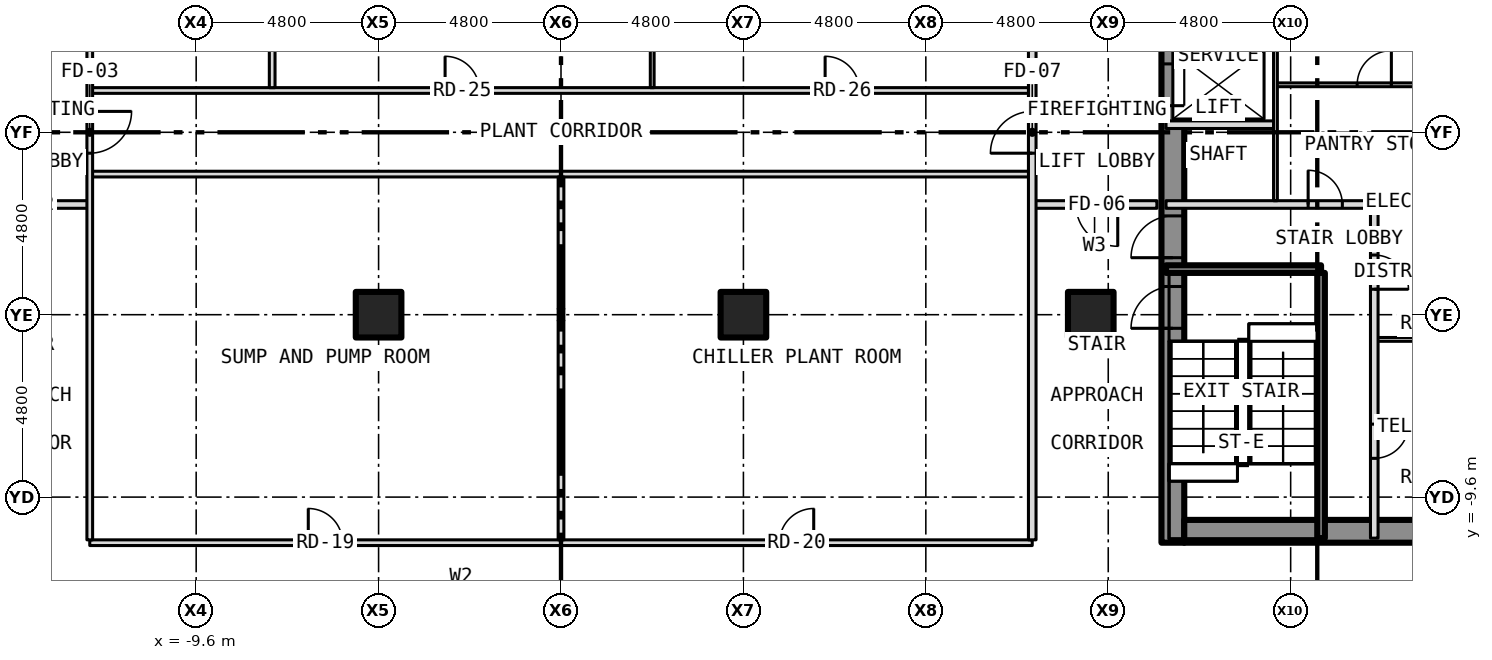
"""IFC4 building model, lengths in metres.
Left out: names, types, materials, properties, quantities, classifications, styles, units other than length and angle.
Written with IfcOpenShell. Run it as: python <this file> out.ifc"""

import sys

from ifc_helpers import new_model, si_unit, direction, frame, frame_2d, origin, origin_2d, place, context, subcontext, project, spatial, rectangle, hollow_rectangle, extrude, element, fill, save


model = new_model("IFC4")
c1 = context("Model", 3, precision=1e-05, world=origin(), true_north=direction((0.0, 1.0)))
c2 = subcontext(c1, "Body", "Model", "MODEL_VIEW")
j1 = project(units=[si_unit("LENGTHUNIT", "METRE"), si_unit("PLANEANGLEUNIT", "RADIAN")], contexts=[c1])
p1 = place(None, origin())
s1 = spatial("IfcSite", under=j1, at=p1, CompositionType="ELEMENT")
p2 = place(p1, origin())
s2 = spatial("IfcBuilding", under=s1, at=p2, CompositionType="ELEMENT")
p3 = place(p2, frame((0.0, 0.0, -10.0)))
s3 = spatial("IfcBuildingStorey", under=s2, at=p3, CompositionType="ELEMENT", Elevation=-10.0)
for number, where, z_axis, x_axis in (
    (1, (-4.8, -4.8, -0.6), (0.0, 0.0, 1.0), (1.0, 0.0, 0.0)),
    (2, (4.8, -4.8, -0.6), (0.0, 0.0, 1.0), (1.0, 0.0, 0.0)),
    (3, (13.94, -4.8, -0.6), (0.0, 0.0, 1.0), (1.0, 0.0, 0.0)),
):
    element("IfcColumn", number, at=place(p3, frame(where, z_axis=z_axis, x_axis=x_axis)), inside=s3, PredefinedType="COLUMN", context=c2, shape_type="SweptSolid", body=[
        extrude(hollow_rectangle(XDim=1.2, YDim=1.2, WallThickness=0.07, at=origin_2d()), origin(), (0.0, 0.0, 1.0), 5.3),
    ])
p4 = place(p3, frame((16.1, -10.8, 0.0), z_axis=(0.0, 0.0, 1.0), x_axis=(0.0, 1.0, 0.0)))
e4 = element("IfcWall", 4, at=p4, inside=s3, PredefinedType="SHEAR", context=c2, shape_type="SweptSolid", body=[
    extrude(rectangle(XDim=21.6, YDim=0.6, at=frame_2d((10.8, 0.0))), origin(), (0.0, 0.0, 1.0), 4.7),
])
p5 = place(p4, frame((11.5, 0.0, 0.0)))
e5 = element("IfcOpeningElement", 5, at=p5, cuts=e4, PredefinedType="OPENING", context=c2, shape_type="SweptSolid", body=[
    extrude(rectangle(XDim=1.1, YDim=2.1, at=frame_2d((0.55, 1.05))), frame((0.0, 0.312, 0.0), z_axis=(0.0, -1.0, 0.0), x_axis=(1.0, 0.0, 0.0)), (0.0, 0.0, 1.0), 0.624),
])
p6 = place(p4, frame((5.642, 0.0, 0.0)))
e6 = element("IfcOpeningElement", 6, at=p6, cuts=e4, PredefinedType="OPENING", context=c2, shape_type="SweptSolid", body=[
    extrude(rectangle(XDim=1.1, YDim=2.1, at=frame_2d((0.55, 1.05))), frame((0.0, 0.312, 0.0), z_axis=(0.0, -1.0, 0.0), x_axis=(1.0, 0.0, 0.0)), (0.0, 0.0, 1.0), 0.624),
])
p7 = place(p4, frame((7.5, 0.0, 0.0)))
e7 = element("IfcOpeningElement", 7, at=p7, cuts=e4, PredefinedType="OPENING", context=c2, shape_type="SweptSolid", body=[
    extrude(rectangle(XDim=1.1, YDim=2.1, at=frame_2d((0.55, 1.05))), frame((0.0, 0.312, 0.0), z_axis=(0.0, -1.0, 0.0), x_axis=(1.0, 0.0, 0.0)), (0.0, 0.0, 1.0), 0.624),
])
p8 = place(p3, frame((16.4, -10.5, 0.0), z_axis=(0.0, 0.0, 1.0), x_axis=(1.0, 0.0, 0.0)))
e8 = element("IfcWall", 8, at=p8, inside=s3, PredefinedType="SHEAR", context=c2, shape_type="SweptSolid", body=[
    extrude(rectangle(XDim=7.0, YDim=0.6, at=frame_2d((3.5, 0.0))), origin(), (0.0, 0.0, 1.0), 4.7),
])
p9 = place(p3, frame((-12.4, -10.8, 0.0), z_axis=(0.0, 0.0, 1.0), x_axis=(1.0, 0.0, 0.0)))
e9 = element("IfcWall", 9, at=p9, inside=s3, PredefinedType="PARTITIONING", context=c2, shape_type="SweptSolid", body=[
    extrude(rectangle(XDim=24.8, YDim=0.15, at=frame_2d((12.4, 0.0))), origin(), (0.0, 0.0, 1.0), 4.7),
])
p10 = place(p9, frame((5.75, 0.0, 0.0)))
e10 = element("IfcOpeningElement", 10, at=p10, cuts=e9, PredefinedType="OPENING", context=c2, shape_type="SweptSolid", body=[
    extrude(rectangle(XDim=0.9, YDim=2.1, at=frame_2d((0.45, 1.05))), frame((0.0, 0.087, 0.0), z_axis=(0.0, -1.0, 0.0), x_axis=(1.0, 0.0, 0.0)), (0.0, 0.0, 1.0), 0.174),
])
p11 = place(p9, frame((18.15, 0.0, 0.0)))
e11 = element("IfcOpeningElement", 11, at=p11, cuts=e9, PredefinedType="OPENING", context=c2, shape_type="SweptSolid", body=[
    extrude(rectangle(XDim=0.9, YDim=2.1, at=frame_2d((0.45, 1.05))), frame((0.0, 0.087, 0.0), z_axis=(0.0, -1.0, 0.0), x_axis=(1.0, 0.0, 0.0)), (0.0, 0.0, 1.0), 0.174),
])
p12 = place(p3, frame((21.4, -5.45, 0.0), z_axis=(0.0, 0.0, 1.0), x_axis=(1.0, 0.0, 0.0)))
e12 = element("IfcWall", 12, at=p12, inside=s3, PredefinedType="PARTITIONING", context=c2, shape_type="SweptSolid", body=[
    extrude(rectangle(XDim=2.48, YDim=0.1, at=frame_2d((1.24, 0.0))), origin(), (0.0, 0.0, 1.0), 4.7),
])
p13 = place(p3, frame((15.92, -3.6, 0.0), z_axis=(0.0, 0.0, 1.0), x_axis=(1.0, 0.0, 0.0)))
e13 = element("IfcWall", 13, at=p13, inside=s3, PredefinedType="SHEAR", context=c2, shape_type="SweptSolid", body=[
    extrude(rectangle(XDim=4.08, YDim=0.2, at=frame_2d((2.04, 0.0))), origin(), (0.0, 0.0, 1.0), 4.7),
])
p14 = place(p3, frame((-15.68, -1.9, 0.0), z_axis=(0.0, 0.0, 1.0), x_axis=(1.0, 0.0, 0.0)))
e14 = element("IfcWall", 14, at=p14, inside=s3, PredefinedType="PARTITIONING", context=c2, shape_type="SweptSolid", body=[
    extrude(rectangle(XDim=3.28, YDim=0.2, at=frame_2d((1.64, 0.0))), origin(), (0.0, 0.0, 1.0), 4.7),
])
p15 = place(p14, frame((1.03, 0.0, 0.0)))
e15 = element("IfcOpeningElement", 15, at=p15, cuts=e14, PredefinedType="OPENING", context=c2, shape_type="SweptSolid", body=[
    extrude(rectangle(XDim=1.1, YDim=2.1, at=frame_2d((0.55, 1.05))), frame((0.0, 0.112, 0.0), z_axis=(0.0, -1.0, 0.0), x_axis=(1.0, 0.0, 0.0)), (0.0, 0.0, 1.0), 0.224),
])
p16 = place(p3, frame((12.4, -1.9, 0.0), z_axis=(0.0, 0.0, 1.0), x_axis=(1.0, 0.0, 0.0)))
e16 = element("IfcWall", 16, at=p16, inside=s3, PredefinedType="PARTITIONING", context=c2, shape_type="SweptSolid", body=[
    extrude(rectangle(XDim=3.28, YDim=0.2, at=frame_2d((1.64, 0.0))), origin(), (0.0, 0.0, 1.0), 4.7),
])
p17 = place(p16, frame((1.15, 0.0, 0.0)))
e17 = element("IfcOpeningElement", 17, at=p17, cuts=e16, PredefinedType="OPENING", context=c2, shape_type="SweptSolid", body=[
    extrude(rectangle(XDim=1.1, YDim=2.1, at=frame_2d((0.55, 1.05))), frame((0.0, 0.112, 0.0), z_axis=(0.0, -1.0, 0.0), x_axis=(1.0, 0.0, 0.0)), (0.0, 0.0, 1.0), 0.224),
])
p18 = place(p3, frame((15.92, -1.9, 0.0), z_axis=(0.0, 0.0, 1.0), x_axis=(1.0, 0.0, 0.0)))
e18 = element("IfcWall", 18, at=p18, inside=s3, PredefinedType="PARTITIONING", context=c2, shape_type="SweptSolid", body=[
    extrude(rectangle(XDim=7.96, YDim=0.2, at=frame_2d((3.98, 0.0))), origin(), (0.0, 0.0, 1.0), 4.7),
])
p19 = place(p18, frame((3.74, 0.0, 0.0)))
e19 = element("IfcOpeningElement", 19, at=p19, cuts=e18, PredefinedType="OPENING", context=c2, shape_type="SweptSolid", body=[
    extrude(rectangle(XDim=0.9, YDim=2.1, at=frame_2d((0.45, 1.05))), frame((0.0, 0.112, 0.0), z_axis=(0.0, -1.0, 0.0), x_axis=(1.0, 0.0, 0.0)), (0.0, 0.0, 1.0), 0.224),
])
p20 = place(p3, frame((-12.4, -1.1, 0.0), z_axis=(0.0, 0.0, 1.0), x_axis=(1.0, 0.0, 0.0)))
e20 = element("IfcWall", 20, at=p20, inside=s3, PredefinedType="PARTITIONING", context=c2, shape_type="SweptSolid", body=[
    extrude(rectangle(XDim=24.8, YDim=0.15, at=frame_2d((12.4, 0.0))), origin(), (0.0, 0.0, 1.0), 4.7),
])
p21 = place(p3, frame((15.92, 0.2, 0.0), z_axis=(0.0, 0.0, 1.0), x_axis=(1.0, 0.0, 0.0)))
e21 = element("IfcWall", 21, at=p21, inside=s3, PredefinedType="PARTITIONING", context=c2, shape_type="SweptSolid", body=[
    extrude(rectangle(XDim=2.88, YDim=0.2, at=frame_2d((1.44, 0.0))), origin(), (0.0, 0.0, 1.0), 4.7),
])
p22 = place(p3, frame((-12.4, 1.1, 0.0), z_axis=(0.0, 0.0, 1.0), x_axis=(1.0, 0.0, 0.0)))
e22 = element("IfcWall", 22, at=p22, inside=s3, PredefinedType="PARTITIONING", context=c2, shape_type="SweptSolid", body=[
    extrude(rectangle(XDim=24.8, YDim=0.15, at=frame_2d((12.4, 0.0))), origin(), (0.0, 0.0, 1.0), 4.7),
])
p23 = place(p22, frame((9.35, 0.0, 0.0)))
e23 = element("IfcOpeningElement", 23, at=p23, cuts=e22, PredefinedType="OPENING", context=c2, shape_type="SweptSolid", body=[
    extrude(rectangle(XDim=0.9, YDim=2.1, at=frame_2d((0.45, 1.05))), frame((0.0, 0.087, 0.0), z_axis=(0.0, -1.0, 0.0), x_axis=(1.0, 0.0, 0.0)), (0.0, 0.0, 1.0), 0.174),
])
p24 = place(p22, frame((19.35, 0.0, 0.0)))
e24 = element("IfcOpeningElement", 24, at=p24, cuts=e22, PredefinedType="OPENING", context=c2, shape_type="SweptSolid", body=[
    extrude(rectangle(XDim=0.9, YDim=2.1, at=frame_2d((0.45, 1.05))), frame((0.0, 0.087, 0.0), z_axis=(0.0, -1.0, 0.0), x_axis=(1.0, 0.0, 0.0)), (0.0, 0.0, 1.0), 0.174),
])
p25 = place(p3, frame((18.8, 1.25, 0.0), z_axis=(0.0, 0.0, 1.0), x_axis=(1.0, 0.0, 0.0)))
e25 = element("IfcWall", 25, at=p25, inside=s3, PredefinedType="PARTITIONING", context=c2, shape_type="SweptSolid", body=[
    extrude(rectangle(XDim=5.08, YDim=0.1, at=frame_2d((2.54, 0.0))), origin(), (0.0, 0.0, 1.0), 4.7),
])
p26 = place(p25, frame((2.15, 0.0, 0.0)))
e26 = element("IfcOpeningElement", 26, at=p26, cuts=e25, PredefinedType="OPENING", context=c2, shape_type="SweptSolid", body=[
    extrude(rectangle(XDim=0.9, YDim=2.1, at=frame_2d((0.45, 1.05))), frame((0.0, 0.062, 0.0), z_axis=(0.0, -1.0, 0.0), x_axis=(1.0, 0.0, 0.0)), (0.0, 0.0, 1.0), 0.124),
])
p27 = place(p3, frame((-12.4, -10.725, 0.0), z_axis=(0.0, 0.0, 1.0), x_axis=(0.0, 1.0, 0.0)))
e27 = element("IfcWall", 27, at=p27, inside=s3, PredefinedType="PARTITIONING", context=c2, shape_type="SweptSolid", body=[
    extrude(rectangle(XDim=12.925, YDim=0.15, at=frame_2d((6.462, 0.0))), origin(), (0.0, 0.0, 1.0), 4.7),
])
p28 = place(p27, frame((10.175, 0.0, 0.0)))
e28 = element("IfcOpeningElement", 28, at=p28, cuts=e27, PredefinedType="OPENING", context=c2, shape_type="SweptSolid", body=[
    extrude(rectangle(XDim=1.1, YDim=2.1, at=frame_2d((0.55, 1.05))), frame((0.0, 0.087, 0.0), z_axis=(0.0, -1.0, 0.0), x_axis=(1.0, 0.0, 0.0)), (0.0, 0.0, 1.0), 0.174),
])
p29 = place(p3, frame((-7.6, 1.175, 0.0), z_axis=(0.0, 0.0, 1.0), x_axis=(0.0, 1.0, 0.0)))
e29 = element("IfcWall", 29, at=p29, inside=s3, PredefinedType="PARTITIONING", context=c2, shape_type="SweptSolid", body=[
    extrude(rectangle(XDim=11.075, YDim=0.15, at=frame_2d((5.538, 0.0))), origin(), (0.0, 0.0, 1.0), 4.7),
])
p30 = place(p3, frame((0.0, -10.725, 0.0), z_axis=(0.0, 0.0, 1.0), x_axis=(0.0, 1.0, 0.0)))
e30 = element("IfcWall", 30, at=p30, inside=s3, PredefinedType="PARTITIONING", context=c2, shape_type="SweptSolid", body=[
    extrude(rectangle(XDim=5.771, YDim=0.15, at=frame_2d((2.885, 0.0))), origin(), (0.0, 0.0, 1.0), 4.083),
])
p31 = place(p3, frame((0.0, -4.954, 0.0), z_axis=(0.0, 0.0, 1.0), x_axis=(0.0, 1.0, 0.0)))
e31 = element("IfcWall", 31, at=p31, inside=s3, PredefinedType="PARTITIONING", context=c2, shape_type="SweptSolid", body=[
    extrude(rectangle(XDim=0.308, YDim=0.15, at=frame_2d((0.154, 0.0))), origin(), (0.0, 0.0, 1.0), 4.7),
])
p32 = place(p3, frame((0.0, -4.646, 0.0), z_axis=(0.0, 0.0, 1.0), x_axis=(0.0, 1.0, 0.0)))
e32 = element("IfcWall", 32, at=p32, inside=s3, PredefinedType="PARTITIONING", context=c2, shape_type="SweptSolid", body=[
    extrude(rectangle(XDim=3.471, YDim=0.15, at=frame_2d((1.735, 0.0))), origin(), (0.0, 0.0, 1.0), 4.083),
])
p33 = place(p3, frame((2.4, 1.175, 0.0), z_axis=(0.0, 0.0, 1.0), x_axis=(0.0, 1.0, 0.0)))
e33 = element("IfcWall", 33, at=p33, inside=s3, PredefinedType="PARTITIONING", context=c2, shape_type="SweptSolid", body=[
    extrude(rectangle(XDim=11.075, YDim=0.1, at=frame_2d((5.538, 0.0))), origin(), (0.0, 0.0, 1.0), 4.7),
])
p34 = place(p3, frame((12.4, -10.725, 0.0), z_axis=(0.0, 0.0, 1.0), x_axis=(0.0, 1.0, 0.0)))
e34 = element("IfcWall", 34, at=p34, inside=s3, PredefinedType="PARTITIONING", context=c2, shape_type="SweptSolid", body=[
    extrude(rectangle(XDim=22.975, YDim=0.2, at=frame_2d((11.488, 0.0))), origin(), (0.0, 0.0, 1.0), 4.7),
])
p35 = place(p34, frame((10.175, 0.0, 0.0)))
e35 = element("IfcOpeningElement", 35, at=p35, cuts=e34, PredefinedType="OPENING", context=c2, shape_type="SweptSolid", body=[
    extrude(rectangle(XDim=1.1, YDim=2.1, at=frame_2d((0.55, 1.05))), frame((0.0, 0.112, 0.0), z_axis=(0.0, -1.0, 0.0), x_axis=(1.0, 0.0, 0.0)), (0.0, 0.0, 1.0), 0.224),
])
p36 = place(p3, frame((18.8, -1.8, 0.0), z_axis=(0.0, 0.0, 1.0), x_axis=(0.0, 1.0, 0.0)))
e36 = element("IfcWall", 36, at=p36, inside=s3, PredefinedType="PARTITIONING", context=c2, shape_type="SweptSolid", body=[
    extrude(rectangle(XDim=12.48, YDim=0.1, at=frame_2d((6.24, 0.0))), origin(), (0.0, 0.0, 1.0), 4.7),
])
p37 = place(p3, frame((20.0, -10.68, 0.0), z_axis=(0.0, 0.0, 1.0), x_axis=(0.0, 1.0, 0.0)))
e37 = element("IfcWall", 37, at=p37, inside=s3, PredefinedType="SHEAR", context=c2, shape_type="SweptSolid", body=[
    extrude(rectangle(XDim=6.98, YDim=0.2, at=frame_2d((3.49, 0.0))), origin(), (0.0, 0.0, 1.0), 4.7),
])
p38 = place(p3, frame((21.4, -10.68, 0.0), z_axis=(0.0, 0.0, 1.0), x_axis=(0.0, 1.0, 0.0)))
e38 = element("IfcWall", 38, at=p38, inside=s3, PredefinedType="PARTITIONING", context=c2, shape_type="SweptSolid", body=[
    extrude(rectangle(XDim=8.68, YDim=0.2, at=frame_2d((4.34, 0.0))), origin(), (0.0, 0.0, 1.0), 4.7),
])
p39 = place(p38, frame((2.1, 0.0, 0.0)))
e39 = element("IfcOpeningElement", 39, at=p39, cuts=e38, PredefinedType="OPENING", context=c2, shape_type="SweptSolid", body=[
    extrude(rectangle(XDim=0.9, YDim=2.1, at=frame_2d((0.45, 1.05))), frame((0.0, 0.112, 0.0), z_axis=(0.0, -1.0, 0.0), x_axis=(1.0, 0.0, 0.0)), (0.0, 0.0, 1.0), 0.224),
])
p40 = place(p38, frame((6.55, 0.0, 0.0)))
e40 = element("IfcOpeningElement", 40, at=p40, cuts=e38, PredefinedType="OPENING", context=c2, shape_type="SweptSolid", body=[
    extrude(rectangle(XDim=0.9, YDim=2.1, at=frame_2d((0.45, 1.05))), frame((0.0, 0.112, 0.0), z_axis=(0.0, -1.0, 0.0), x_axis=(1.0, 0.0, 0.0)), (0.0, 0.0, 1.0), 0.224),
])
p41 = place(p5, origin())
e41 = element("IfcDoor", 41, at=p41, inside=s3, OperationType="SLIDING_TO_LEFT", PredefinedType="DOOR", context=c2, shape_type="SweptSolid", body=[
    extrude(rectangle(XDim=1.1, YDim=2.1, at=frame_2d((0.55, 1.05))), frame((0.0, 0.025, 0.0), z_axis=(0.0, -1.0, 0.0), x_axis=(1.0, 0.0, 0.0)), (0.0, 0.0, 1.0), 0.05),
])
fill(e5, e41)
p42 = place(p28, origin())
e42 = element("IfcDoor", 42, at=p42, inside=s3, OperationType="SINGLE_SWING_RIGHT", PredefinedType="DOOR", context=c2, shape_type="SweptSolid", body=[
    extrude(rectangle(XDim=1.1, YDim=2.1, at=frame_2d((0.55, 1.05))), frame((0.0, 0.025, 0.0), z_axis=(0.0, -1.0, 0.0), x_axis=(1.0, 0.0, 0.0)), (0.0, 0.0, 1.0), 0.05),
])
fill(e28, e42)
p43 = place(p6, origin())
e43 = element("IfcDoor", 43, at=p43, inside=s3, OperationType="SINGLE_SWING_LEFT", PredefinedType="DOOR", context=c2, shape_type="SweptSolid", body=[
    extrude(rectangle(XDim=1.1, YDim=2.1, at=frame_2d((0.55, 1.05))), frame((0.0, 0.025, 0.0), z_axis=(0.0, -1.0, 0.0), x_axis=(1.0, 0.0, 0.0)), (0.0, 0.0, 1.0), 0.05),
])
fill(e6, e43)
p44 = place(p7, origin())
e44 = element("IfcDoor", 44, at=p44, inside=s3, OperationType="SINGLE_SWING_LEFT", PredefinedType="DOOR", context=c2, shape_type="SweptSolid", body=[
    extrude(rectangle(XDim=1.1, YDim=2.1, at=frame_2d((0.55, 1.05))), frame((0.0, 0.025, 0.0), z_axis=(0.0, -1.0, 0.0), x_axis=(1.0, 0.0, 0.0)), (0.0, 0.0, 1.0), 0.05),
])
fill(e7, e44)
p45 = place(p39, origin())
e45 = element("IfcDoor", 45, at=p45, inside=s3, OperationType="SINGLE_SWING_RIGHT", PredefinedType="DOOR", context=c2, shape_type="SweptSolid", body=[
    extrude(rectangle(XDim=0.9, YDim=2.1, at=frame_2d((0.45, 1.05))), frame((0.0, 0.025, 0.0), z_axis=(0.0, -1.0, 0.0), x_axis=(1.0, 0.0, 0.0)), (0.0, 0.0, 1.0), 0.05),
])
fill(e39, e45)
p46 = place(p40, origin())
e46 = element("IfcDoor", 46, at=p46, inside=s3, OperationType="SINGLE_SWING_LEFT", PredefinedType="DOOR", context=c2, shape_type="SweptSolid", body=[
    extrude(rectangle(XDim=0.9, YDim=2.1, at=frame_2d((0.45, 1.05))), frame((0.0, 0.025, 0.0), z_axis=(0.0, -1.0, 0.0), x_axis=(1.0, 0.0, 0.0)), (0.0, 0.0, 1.0), 0.05),
])
fill(e40, e46)
p47 = place(p19, origin())
e47 = element("IfcDoor", 47, at=p47, inside=s3, OperationType="SINGLE_SWING_LEFT", PredefinedType="DOOR", context=c2, shape_type="SweptSolid", body=[
    extrude(rectangle(XDim=0.9, YDim=2.1, at=frame_2d((0.45, 1.05))), frame((0.0, 0.025, 0.0), z_axis=(0.0, -1.0, 0.0), x_axis=(1.0, 0.0, 0.0)), (0.0, 0.0, 1.0), 0.05),
])
fill(e19, e47)
p48 = place(p26, origin())
e48 = element("IfcDoor", 48, at=p48, inside=s3, OperationType="SINGLE_SWING_RIGHT", PredefinedType="DOOR", context=c2, shape_type="SweptSolid", body=[
    extrude(rectangle(XDim=0.9, YDim=2.1, at=frame_2d((0.45, 1.05))), frame((0.0, 0.025, 0.0), z_axis=(0.0, -1.0, 0.0), x_axis=(1.0, 0.0, 0.0)), (0.0, 0.0, 1.0), 0.05),
])
fill(e26, e48)
p49 = place(p17, origin())
e49 = element("IfcDoor", 49, at=p49, inside=s3, OperationType="SINGLE_SWING_RIGHT", PredefinedType="DOOR", context=c2, shape_type="SweptSolid", body=[
    extrude(rectangle(XDim=1.1, YDim=2.1, at=frame_2d((0.55, 1.05))), frame((0.0, 0.025, 0.0), z_axis=(0.0, -1.0, 0.0), x_axis=(1.0, 0.0, 0.0)), (0.0, 0.0, 1.0), 0.05),
])
fill(e17, e49)
p50 = place(p35, origin())
e50 = element("IfcDoor", 50, at=p50, inside=s3, OperationType="SINGLE_SWING_LEFT", PredefinedType="DOOR", context=c2, shape_type="SweptSolid", body=[
    extrude(rectangle(XDim=1.1, YDim=2.1, at=frame_2d((0.55, 1.05))), frame((0.0, 0.025, 0.0), z_axis=(0.0, -1.0, 0.0), x_axis=(1.0, 0.0, 0.0)), (0.0, 0.0, 1.0), 0.05),
])
fill(e35, e50)
p51 = place(p10, origin())
e51 = element("IfcDoor", 51, at=p51, inside=s3, OperationType="SINGLE_SWING_LEFT", PredefinedType="DOOR", context=c2, shape_type="SweptSolid", body=[
    extrude(rectangle(XDim=0.9, YDim=2.1, at=frame_2d((0.45, 1.05))), frame((0.0, 0.025, 0.0), z_axis=(0.0, -1.0, 0.0), x_axis=(1.0, 0.0, 0.0)), (0.0, 0.0, 1.0), 0.05),
])
fill(e10, e51)
p52 = place(p11, origin())
e52 = element("IfcDoor", 52, at=p52, inside=s3, OperationType="SINGLE_SWING_RIGHT", PredefinedType="DOOR", context=c2, shape_type="SweptSolid", body=[
    extrude(rectangle(XDim=0.9, YDim=2.1, at=frame_2d((0.45, 1.05))), frame((0.0, 0.025, 0.0), z_axis=(0.0, -1.0, 0.0), x_axis=(1.0, 0.0, 0.0)), (0.0, 0.0, 1.0), 0.05),
])
fill(e11, e52)
p53 = place(p23, origin())
e53 = element("IfcDoor", 53, at=p53, inside=s3, OperationType="SINGLE_SWING_LEFT", PredefinedType="DOOR", context=c2, shape_type="SweptSolid", body=[
    extrude(rectangle(XDim=0.9, YDim=2.1, at=frame_2d((0.45, 1.05))), frame((0.0, 0.025, 0.0), z_axis=(0.0, -1.0, 0.0), x_axis=(1.0, 0.0, 0.0)), (0.0, 0.0, 1.0), 0.05),
])
fill(e23, e53)
p54 = place(p24, origin())
e54 = element("IfcDoor", 54, at=p54, inside=s3, OperationType="SINGLE_SWING_LEFT", PredefinedType="DOOR", context=c2, shape_type="SweptSolid", body=[
    extrude(rectangle(XDim=0.9, YDim=2.1, at=frame_2d((0.45, 1.05))), frame((0.0, 0.025, 0.0), z_axis=(0.0, -1.0, 0.0), x_axis=(1.0, 0.0, 0.0)), (0.0, 0.0, 1.0), 0.05),
])
fill(e24, e54)
save(model, sys.argv[1])
